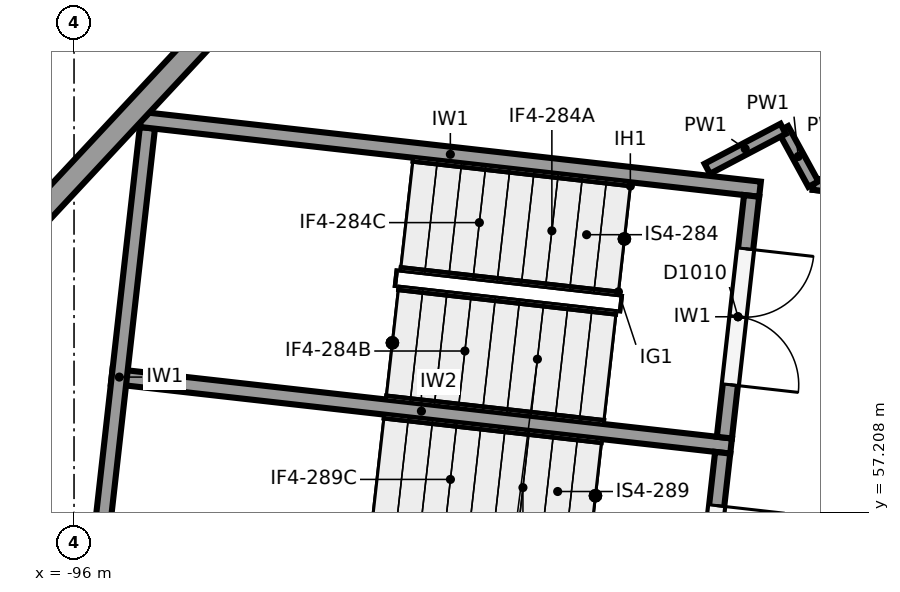
"""IFC4 building model, lengths in metres.
Left out: names, types, materials, properties, quantities, classifications, styles, units other than length and angle.
Written with IfcOpenShell. Run it as: python <this file> out.ifc"""

import sys

from ifc_helpers import new_model, si_unit, direction, frame, frame_2d, origin, place, context, subcontext, project, spatial, rectangle, extrude, element, fill, save


model = new_model("IFC4")
c1 = context("Model", 3, precision=1e-05, world=origin(), true_north=direction((0.0, 1.0)))
c2 = subcontext(c1, "Body", "Model", "MODEL_VIEW")
j1 = project(units=[si_unit("LENGTHUNIT", "METRE"), si_unit("PLANEANGLEUNIT", "RADIAN")], contexts=[c1])
p1 = place(None, origin())
s1 = spatial("IfcSite", under=j1, at=p1, CompositionType="ELEMENT")
p2 = place(p1, origin())
s2 = spatial("IfcBuilding", under=s1, at=p2, CompositionType="ELEMENT")
p3 = place(p2, frame((0.0, 0.0, 12.0)))
s3 = spatial("IfcBuildingStorey", under=s2, at=p3, CompositionType="ELEMENT", Elevation=12.0)
p4 = place(p3, frame((-100.711, 56.568, 0.0), z_axis=(0.0, 0.0, 1.0), x_axis=(0.681794658463, 0.731543603411, 0.0)))
e1 = element("IfcWall", 1, at=p4, inside=s3, PredefinedType="SOLIDWALL", context=c2, shape_type="SweptSolid", body=[
    extrude(rectangle(XDim=12.514, YDim=0.3, at=frame_2d((6.257, 0.0))), origin(), (0.0, 0.0, 1.0), 4.35),
])
p5 = place(p3, frame((-95.123, 62.378, 0.0), z_axis=(0.0, 0.0, 1.0), x_axis=(0.993710792168, -0.111977058046, 0.0)))
e2 = element("IfcWall", 2, at=p5, inside=s3, PredefinedType="SHEAR", context=c2, shape_type="SweptSolid", body=[
    extrude(rectangle(XDim=8.2, YDim=0.2, at=frame_2d((4.1, 0.0))), origin(), (0.0, 0.0, 1.0), 5.65),
])
p6 = place(p3, frame((-95.035, 62.267, 0.0), z_axis=(0.0, 0.0, 1.0), x_axis=(-0.111933579504, -0.993715690617, 0.0)))
e3 = element("IfcWall", 3, at=p6, inside=s3, PredefinedType="SHEAR", context=c2, shape_type="SweptSolid", body=[
    extrude(rectangle(XDim=6.6, YDim=0.2, at=frame_2d((3.3, 0.0))), origin(), (0.0, 0.0, 1.0), 5.65),
])
p7 = place(p3, frame((-95.504, 58.999, 0.0), z_axis=(0.0, 0.0, 1.0), x_axis=(0.993710792168, -0.111977058046, 0.0)))
e4 = element("IfcWall", 4, at=p7, inside=s3, PredefinedType="SHEAR", context=c2, shape_type="SweptSolid", body=[
    extrude(rectangle(XDim=8.2, YDim=0.2, at=frame_2d((4.1, 0.0))), origin(), (0.0, 0.0, 1.0), 5.65),
])
p8 = place(p3, frame((-87.085, 61.372, 0.0), z_axis=(0.0, 0.0, 1.0), x_axis=(-0.11192190762, -0.993717005286, 0.0)))
e5 = element("IfcWall", 5, at=p8, inside=s3, PredefinedType="SHEAR", context=c2, shape_type="SweptSolid", body=[
    extrude(rectangle(XDim=3.2, YDim=0.2, at=frame_2d((1.6, 0.0))), origin(), (0.0, 0.0, 1.0), 5.65),
])
p9 = place(p8, frame((0.7, 0.0, 0.0)))
e6 = element("IfcOpeningElement", 6, at=p9, cuts=e5, PredefinedType="OPENING", context=c2, shape_type="SweptSolid", body=[
    extrude(rectangle(XDim=1.8, YDim=2.1, at=frame_2d((0.9, 1.05))), frame((0.0, 0.11, 0.0), z_axis=(0.0, -1.0, 0.0), x_axis=(1.0, 0.0, 0.0)), (0.0, 0.0, 1.0), 0.22),
])
p10 = place(p3, frame((-87.466, 57.993, 0.0), z_axis=(0.0, 0.0, 1.0), x_axis=(-0.111997244021, -0.993708517288, 0.0)))
e7 = element("IfcWall", 7, at=p10, inside=s3, PredefinedType="SHEAR", context=c2, shape_type="SweptSolid", body=[
    extrude(rectangle(XDim=3.2, YDim=0.2, at=frame_2d((1.6, 0.0))), origin(), (0.0, 0.0, 1.0), 5.65),
])
p11 = place(p10, frame((0.7, 0.0, 0.0)))
e8 = element("IfcOpeningElement", 8, at=p11, cuts=e7, PredefinedType="OPENING", context=c2, shape_type="SweptSolid", body=[
    extrude(rectangle(XDim=1.8, YDim=2.1, at=frame_2d((0.9, 1.05))), frame((0.0, 0.11, 0.0), z_axis=(0.0, -1.0, 0.0), x_axis=(1.0, 0.0, 0.0)), (0.0, 0.0, 1.0), 0.22),
])
p12 = place(p3, frame((-79.958, 60.815, 0.0), z_axis=(0.0, 0.0, 1.0), x_axis=(-0.99370867388, 0.111995854638, 0.0)))
e9 = element("IfcWall", 9, at=p12, inside=s3, PredefinedType="PARTITIONING", context=c2, shape_type="SweptSolid", body=[
    extrude(rectangle(XDim=6.354, YDim=0.15, at=frame_2d((3.177, 0.0))), origin(), (0.0, 0.0, 1.0), 4.55),
])
p13 = place(p12, frame((3.85, 0.0, 0.0)))
e10 = element("IfcOpeningElement", 10, at=p13, cuts=e9, PredefinedType="OPENING", context=c2, shape_type="SweptSolid", body=[
    extrude(rectangle(XDim=1.8, YDim=2.1, at=frame_2d((0.9, 1.05))), frame((0.0, 0.085, 0.0), z_axis=(0.0, -1.0, 0.0), x_axis=(1.0, 0.0, 0.0)), (0.0, 0.0, 1.0), 0.17),
])
p14 = place(p3, frame((-85.622, 61.453, 4.55), z_axis=(0.0, 0.0, 1.0), x_axis=(-0.993672626597, 0.11231523117, 0.0)))
e11 = element("IfcWall", 11, at=p14, inside=s3, PredefinedType="PARTITIONING", context=c2, shape_type="SweptSolid", body=[
    extrude(rectangle(XDim=0.654, YDim=0.15, at=frame_2d((0.327, 0.0))), origin(), (0.0, 0.0, 1.0), 1.1),
])
p15 = place(p3, frame((-86.272, 61.527, 0.0), z_axis=(0.0, 0.0, 1.0), x_axis=(-0.480336186773, 0.877084458691, 0.0)))
e12 = element("IfcWall", 12, at=p15, inside=s3, PredefinedType="PARTITIONING", context=c2, shape_type="SweptSolid", body=[
    extrude(rectangle(XDim=0.83, YDim=0.15, at=frame_2d((0.415, 0.0))), origin(), (0.0, 0.0, 1.0), 5.65),
])
p16 = place(p3, frame((-86.67, 62.254, 0.0), z_axis=(0.0, 0.0, 1.0), x_axis=(-0.884880656279, -0.465817801446, 0.0)))
e13 = element("IfcWall", 13, at=p16, inside=s3, PredefinedType="PARTITIONING", context=c2, shape_type="SweptSolid", body=[
    extrude(rectangle(XDim=1.128, YDim=0.15, at=frame_2d((0.564, 0.0))), origin(), (0.0, 0.0, 1.0), 5.65),
])
p17 = place(p9, origin())
e14 = element("IfcDoor", 14, at=p17, inside=s3, OperationType="DOUBLE_DOOR_SINGLE_SWING", PredefinedType="DOOR", context=c2, shape_type="SweptSolid", body=[
    extrude(rectangle(XDim=1.8, YDim=2.1, at=frame_2d((0.9, 1.05))), frame((0.0, 0.025, 0.0), z_axis=(0.0, -1.0, 0.0), x_axis=(1.0, 0.0, 0.0)), (0.0, 0.0, 1.0), 0.05),
])
fill(e6, e14)
p18 = place(p11, origin())
e15 = element("IfcDoor", 15, at=p18, inside=s3, OperationType="DOUBLE_DOOR_SINGLE_SWING", PredefinedType="DOOR", context=c2, shape_type="SweptSolid", body=[
    extrude(rectangle(XDim=1.8, YDim=2.1, at=frame_2d((0.9, 1.05))), frame((0.0, 0.025, 0.0), z_axis=(0.0, -1.0, 0.0), x_axis=(1.0, 0.0, 0.0)), (0.0, 0.0, 1.0), 0.05),
])
fill(e8, e15)
save(model, sys.argv[1])
